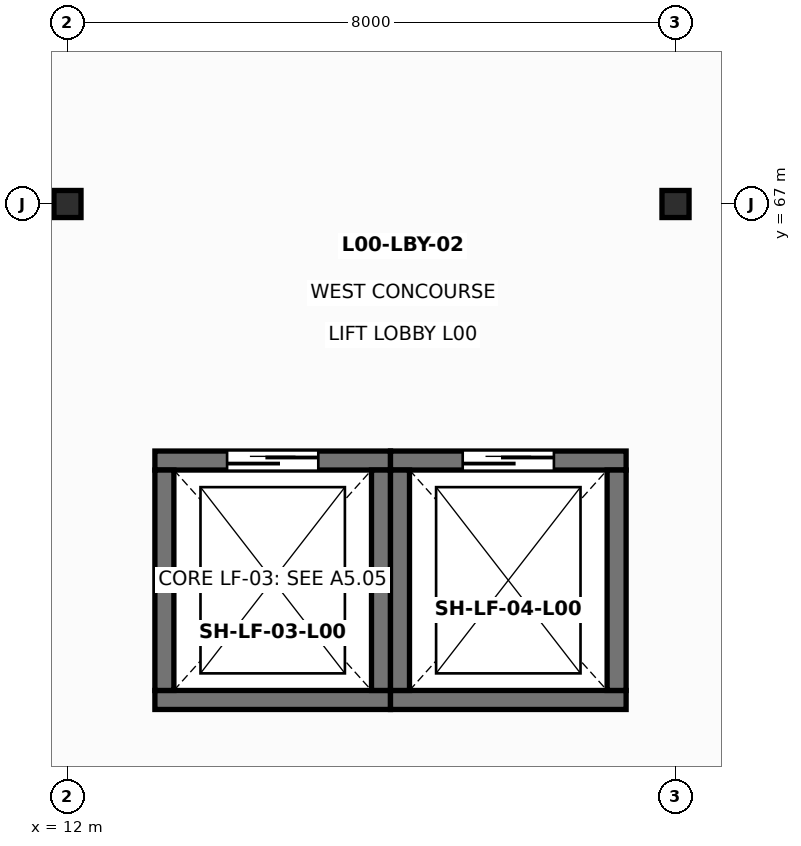
"""IFC4 building model, lengths in metres.
Left out: names, types, materials, properties, quantities, classifications, styles, units other than length and angle.
Written with IfcOpenShell. Run it as: python <this file> out.ifc"""

import sys

from ifc_helpers import new_model, si_unit, direction, frame, frame_2d, origin, origin_2d, place, context, subcontext, project, spatial, rectangle, hollow_rectangle, extrude, element, fill, save


model = new_model("IFC4")
c1 = context("Model", 3, precision=1e-05, world=origin(), true_north=direction((0.0, 1.0)))
c2 = subcontext(c1, "Body", "Model", "MODEL_VIEW")
j1 = project(units=[si_unit("LENGTHUNIT", "METRE"), si_unit("PLANEANGLEUNIT", "RADIAN")], contexts=[c1])
p1 = place(None, origin())
s1 = spatial("IfcSite", under=j1, at=p1, CompositionType="ELEMENT")
p2 = place(p1, origin())
s2 = spatial("IfcBuilding", under=s1, at=p2, CompositionType="ELEMENT")
p3 = place(p2, origin())
s3 = spatial("IfcBuildingStorey", under=s2, at=p3, CompositionType="ELEMENT", Elevation=0.0)
for number, where, z_axis, x_axis in (
    (1, (12.0, 67.0, 0.0), (0.0, 0.0, 1.0), (1.0, 0.0, 0.0)),
    (2, (20.0, 67.0, 0.0), (0.0, 0.0, 1.0), (1.0, 0.0, 0.0)),
):
    element("IfcColumn", number, at=place(p3, frame(where, z_axis=z_axis, x_axis=x_axis)), inside=s3, PredefinedType="COLUMN", context=c2, shape_type="SweptSolid", body=[
        extrude(hollow_rectangle(XDim=0.356, YDim=0.356, WallThickness=0.015, at=origin_2d()), origin(), (0.0, 0.0, 1.0), 6.0),
    ])
p4 = place(p3, frame((13.15, 60.475, 0.0), z_axis=(0.0, 0.0, 1.0), x_axis=(1.0, 0.0, 0.0)))
e3 = element("IfcWall", 3, at=p4, inside=s3, PredefinedType="SOLIDWALL", context=c2, shape_type="SweptSolid", body=[
    extrude(rectangle(XDim=3.1, YDim=0.25, at=frame_2d((1.55, 0.0))), origin(), (0.0, 0.0, 1.0), 5.755),
])
p5 = place(p3, frame((16.25, 63.625, 0.0), z_axis=(0.0, 0.0, 1.0), x_axis=(-1.0, 0.0, 0.0)))
e4 = element("IfcWall", 4, at=p5, inside=s3, PredefinedType="SOLIDWALL", context=c2, shape_type="SweptSolid", body=[
    extrude(rectangle(XDim=3.1, YDim=0.25, at=frame_2d((1.55, 0.0))), origin(), (0.0, 0.0, 1.0), 5.755),
])
p6 = place(p5, frame((0.95, 0.0, 0.0)))
e5 = element("IfcOpeningElement", 5, at=p6, cuts=e4, PredefinedType="OPENING", context=c2, shape_type="SweptSolid", body=[
    extrude(rectangle(XDim=1.2, YDim=2.2, at=frame_2d((0.6, 1.1))), frame((0.0, 0.135, 0.0), z_axis=(0.0, -1.0, 0.0), x_axis=(1.0, 0.0, 0.0)), (0.0, 0.0, 1.0), 0.27),
])
for number, where, z_axis, x_axis in (
    (6, (16.125, 60.6, 0.0), (0.0, 0.0, 1.0), (0.0, 1.0, 0.0)),
    (7, (13.275, 63.5, 0.0), (0.0, 0.0, 1.0), (0.0, -1.0, 0.0)),
):
    element("IfcWall", number, at=place(p3, frame(where, z_axis=z_axis, x_axis=x_axis)), inside=s3, PredefinedType="SOLIDWALL", context=c2, shape_type="SweptSolid", body=[
        extrude(rectangle(XDim=2.9, YDim=0.25, at=frame_2d((1.45, 0.0))), origin(), (0.0, 0.0, 1.0), 5.755),
    ])
p7 = place(p3, frame((16.25, 60.475, 0.0), z_axis=(0.0, 0.0, 1.0), x_axis=(1.0, 0.0, 0.0)))
e8 = element("IfcWall", 8, at=p7, inside=s3, PredefinedType="SOLIDWALL", context=c2, shape_type="SweptSolid", body=[
    extrude(rectangle(XDim=3.1, YDim=0.25, at=frame_2d((1.55, 0.0))), origin(), (0.0, 0.0, 1.0), 5.755),
])
p8 = place(p3, frame((19.35, 63.625, 0.0), z_axis=(0.0, 0.0, 1.0), x_axis=(-1.0, 0.0, 0.0)))
e9 = element("IfcWall", 9, at=p8, inside=s3, PredefinedType="SOLIDWALL", context=c2, shape_type="SweptSolid", body=[
    extrude(rectangle(XDim=3.1, YDim=0.25, at=frame_2d((1.55, 0.0))), origin(), (0.0, 0.0, 1.0), 5.755),
])
p9 = place(p8, frame((0.95, 0.0, 0.0)))
e10 = element("IfcOpeningElement", 10, at=p9, cuts=e9, PredefinedType="OPENING", context=c2, shape_type="SweptSolid", body=[
    extrude(rectangle(XDim=1.2, YDim=2.2, at=frame_2d((0.6, 1.1))), frame((0.0, 0.135, 0.0), z_axis=(0.0, -1.0, 0.0), x_axis=(1.0, 0.0, 0.0)), (0.0, 0.0, 1.0), 0.27),
])
for number, where, z_axis, x_axis in (
    (11, (19.225, 60.6, 0.0), (0.0, 0.0, 1.0), (0.0, 1.0, 0.0)),
    (12, (16.375, 63.5, 0.0), (0.0, 0.0, 1.0), (0.0, -1.0, 0.0)),
):
    element("IfcWall", number, at=place(p3, frame(where, z_axis=z_axis, x_axis=x_axis)), inside=s3, PredefinedType="SOLIDWALL", context=c2, shape_type="SweptSolid", body=[
        extrude(rectangle(XDim=2.9, YDim=0.25, at=frame_2d((1.45, 0.0))), origin(), (0.0, 0.0, 1.0), 5.755),
    ])
p10 = place(p6, frame((1.2, 0.0, 0.0), z_axis=(0.0, 0.0, 1.0), x_axis=(-1.0, 0.0, 0.0)))
e13 = element("IfcDoor", 13, at=p10, inside=s3, OperationType="DOUBLE_DOOR_SLIDING", PredefinedType="DOOR", context=c2, shape_type="SweptSolid", body=[
    extrude(rectangle(XDim=1.2, YDim=2.2, at=frame_2d((0.6, 1.1))), frame((0.0, 0.025, 0.0), z_axis=(0.0, -1.0, 0.0), x_axis=(1.0, 0.0, 0.0)), (0.0, 0.0, 1.0), 0.05),
])
fill(e5, e13)
p11 = place(p9, frame((1.2, 0.0, 0.0), z_axis=(0.0, 0.0, 1.0), x_axis=(-1.0, 0.0, 0.0)))
e14 = element("IfcDoor", 14, at=p11, inside=s3, OperationType="DOUBLE_DOOR_SLIDING", PredefinedType="DOOR", context=c2, shape_type="SweptSolid", body=[
    extrude(rectangle(XDim=1.2, YDim=2.2, at=frame_2d((0.6, 1.1))), frame((0.0, 0.025, 0.0), z_axis=(0.0, -1.0, 0.0), x_axis=(1.0, 0.0, 0.0)), (0.0, 0.0, 1.0), 0.05),
])
fill(e10, e14)
save(model, sys.argv[1])
